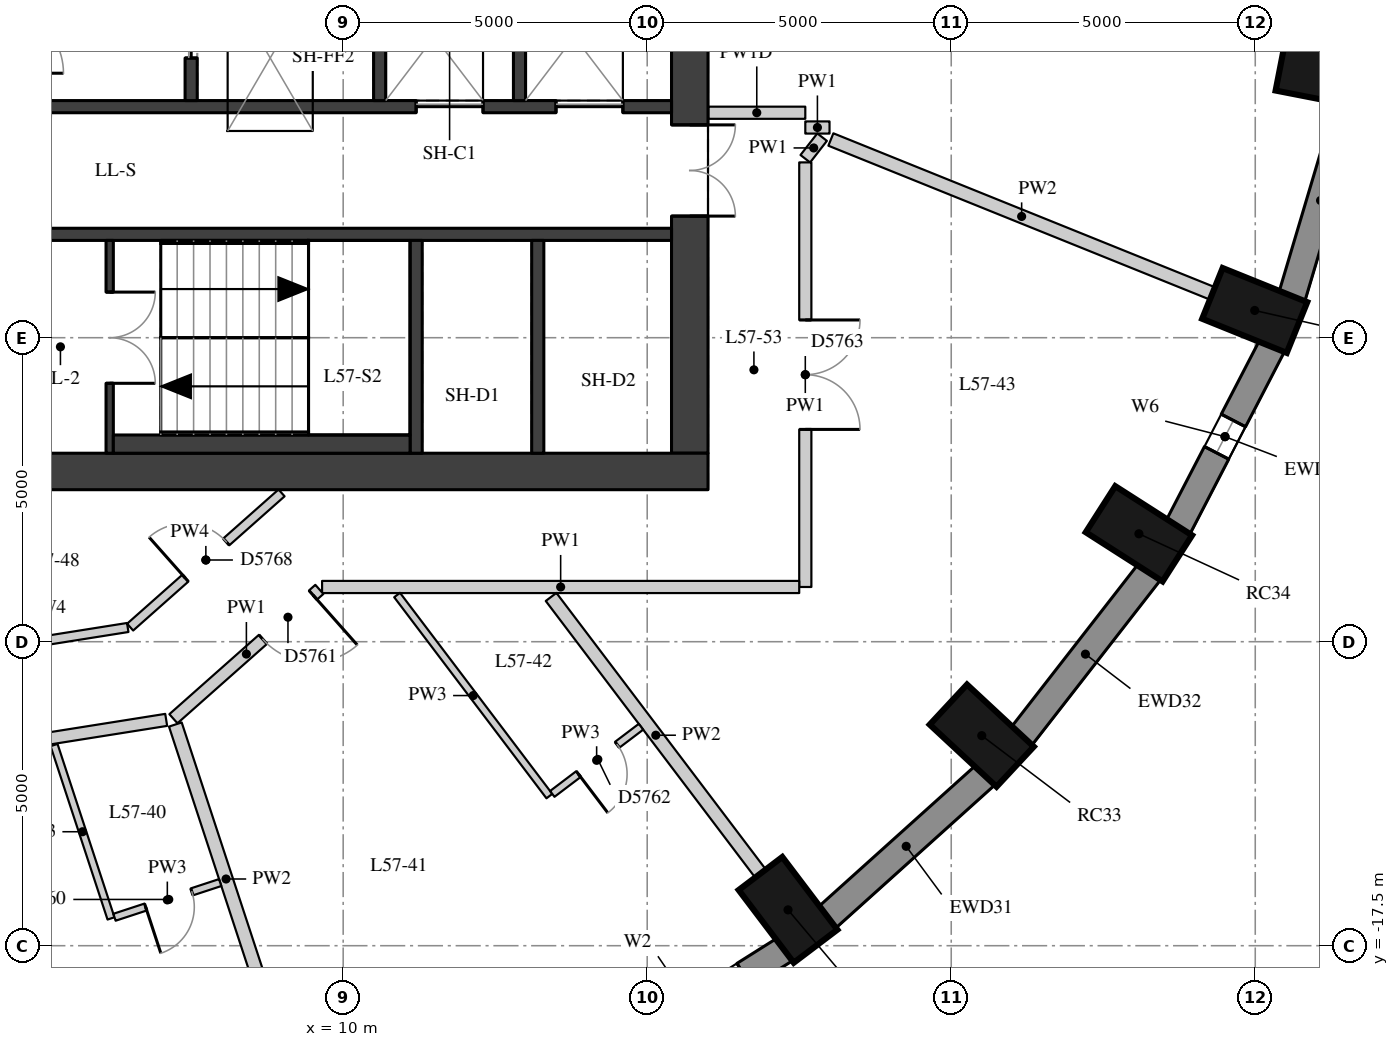
"""IFC4 building model, lengths in metres.
Left out: names, types, materials, properties, quantities, classifications, styles, units other than length and angle.
Written with IfcOpenShell. Run it as: python <this file> out.ifc"""

import sys

from ifc_helpers import new_model, si_unit, direction, frame, frame_2d, origin, origin_2d, place, context, subcontext, project, spatial, rectangle, extrude, element, fill, save


model = new_model("IFC4")
c1 = context("Model", 3, precision=1e-05, world=origin(), true_north=direction((0.0, 1.0)))
c2 = subcontext(c1, "Body", "Model", "MODEL_VIEW")
j1 = project(units=[si_unit("LENGTHUNIT", "METRE"), si_unit("PLANEANGLEUNIT", "RADIAN")], contexts=[c1])
p1 = place(None, origin())
s1 = spatial("IfcSite", under=j1, at=p1, CompositionType="ELEMENT")
p2 = place(p1, origin())
s2 = spatial("IfcBuilding", under=s1, at=p2, CompositionType="ELEMENT")
p3 = place(p2, frame((0.0, 0.0, 202.4)))
s3 = spatial("IfcBuildingStorey", under=s2, at=p3, CompositionType="ELEMENT", Elevation=202.4)
for number, where, z_axis, x_axis in (
    (1, (17.316, -16.911, 0.0), (0.0, 0.0, 1.0), (0.604, -0.797, 0.0)),
    (2, (20.502, -14.045, 0.0), (0.0, 0.0, 1.0), (0.732, -0.681, 0.0)),
    (3, (23.087, -10.725, 0.0), (0.0, 0.0, 1.0), (0.842, -0.539, 0.0)),
    (4, (24.991, -7.052, 0.0), (0.0, 0.0, 1.0), (0.927, -0.374, 0.0)),
    (5, (26.157, -3.137, 0.0), (0.0, 0.0, 1.0), (0.981, -0.192, 0.0)),
):
    element("IfcColumn", number, at=place(p3, frame(where, z_axis=z_axis, x_axis=x_axis)), inside=s3, PredefinedType="COLUMN", context=c2, shape_type="SweptSolid", body=[
        extrude(rectangle(XDim=1.5, YDim=0.9, at=origin_2d()), origin(), (0.0, 0.0, 1.0), 3.3),
    ])
p4 = place(p3, frame((14.232, -19.47, 0.0), z_axis=(0.0, 0.0, 1.0), x_axis=(0.84614984472, 0.532945063098, 0.0)))
e6 = element("IfcWall", 6, at=p4, inside=s3, PredefinedType="SOLIDWALL", context=c2, shape_type="SweptSolid", body=[
    extrude(rectangle(XDim=3.586, YDim=0.45, at=frame_2d((1.793, 0.0))), origin(), (0.0, 0.0, 1.0), 3.02),
])
p5 = place(p4, frame((0.793, 0.0, 0.4)))
e7 = element("IfcOpeningElement", 7, at=p5, cuts=e6, PredefinedType="OPENING", context=c2, shape_type="SweptSolid", body=[
    extrude(rectangle(XDim=2.0, YDim=1.75, at=frame_2d((1.0, 0.875))), frame((0.0, 0.235, 0.0), z_axis=(0.0, -1.0, 0.0), x_axis=(1.0, 0.0, 0.0)), (0.0, 0.0, 1.0), 0.47),
])
p6 = place(p3, frame((17.953, -17.04, 0.0), z_axis=(0.0, 0.0, 1.0), x_axis=(0.743442727602, 0.668799604348, 0.0)))
e8 = element("IfcWall", 8, at=p6, inside=s3, PredefinedType="SOLIDWALL", context=c2, shape_type="SweptSolid", body=[
    extrude(rectangle(XDim=3.513, YDim=0.45, at=frame_2d((1.756, 0.0))), origin(), (0.0, 0.0, 1.0), 3.02),
])
p7 = place(p3, frame((21.151, -14.061, 0.0), z_axis=(0.0, 0.0, 1.0), x_axis=(0.614255239631, 0.789107407509, 0.0)))
e9 = element("IfcWall", 9, at=p7, inside=s3, PredefinedType="SOLIDWALL", context=c2, shape_type="SweptSolid", body=[
    extrude(rectangle(XDim=3.438, YDim=0.45, at=frame_2d((1.719, 0.0))), origin(), (0.0, 0.0, 1.0), 3.02),
])
p8 = place(p3, frame((23.727, -10.624, 0.0), z_axis=(0.0, 0.0, 1.0), x_axis=(0.460175500475, 0.887827972505, 0.0)))
e10 = element("IfcWall", 10, at=p8, inside=s3, PredefinedType="SOLIDWALL", context=c2, shape_type="SweptSolid", body=[
    extrude(rectangle(XDim=3.371, YDim=0.45, at=frame_2d((1.685, 0.0))), origin(), (0.0, 0.0, 1.0), 3.02),
])
p9 = place(p8, frame((1.385, 0.0, 0.4)))
e11 = element("IfcOpeningElement", 11, at=p9, cuts=e10, PredefinedType="OPENING", context=c2, shape_type="SweptSolid", body=[
    extrude(rectangle(XDim=0.6, YDim=1.75, at=frame_2d((0.3, 0.875))), frame((0.0, 0.235, 0.0), z_axis=(0.0, -1.0, 0.0), x_axis=(1.0, 0.0, 0.0)), (0.0, 0.0, 1.0), 0.47),
])
p10 = place(p3, frame((25.6, -6.834, 0.0), z_axis=(0.0, 0.0, 1.0), x_axis=(0.285444972963, 0.958395099847, 0.0)))
e12 = element("IfcWall", 12, at=p10, inside=s3, PredefinedType="SOLIDWALL", context=c2, shape_type="SweptSolid", body=[
    extrude(rectangle(XDim=3.32, YDim=0.45, at=frame_2d((1.66, 0.0))), origin(), (0.0, 0.0, 1.0), 3.02),
])
p11 = place(p3, frame((15.7, -9.4, 0.0), z_axis=(0.0, 0.0, 1.0), x_axis=(0.0, 1.0, 0.0)))
e13 = element("IfcWall", 13, at=p11, inside=s3, PredefinedType="SHEAR", context=c2, shape_type="SweptSolid", body=[
    extrude(rectangle(XDim=18.8, YDim=0.6, at=frame_2d((9.4, 0.0))), origin(), (0.0, 0.0, 1.0), 3.02),
])
p12 = place(p11, frame((13.4, 0.0, 0.0)))
e14 = element("IfcOpeningElement", 14, at=p12, cuts=e13, PredefinedType="OPENING", context=c2, shape_type="SweptSolid", body=[
    extrude(rectangle(XDim=1.5, YDim=2.1, at=frame_2d((0.75, 1.05))), frame((0.0, 0.31, 0.0), z_axis=(0.0, -1.0, 0.0), x_axis=(1.0, 0.0, 0.0)), (0.0, 0.0, 1.0), 0.62),
])
p13 = place(p11, frame((3.9, 0.0, 0.0)))
e15 = element("IfcOpeningElement", 15, at=p13, cuts=e13, PredefinedType="OPENING", context=c2, shape_type="SweptSolid", body=[
    extrude(rectangle(XDim=1.5, YDim=2.1, at=frame_2d((0.75, 1.05))), frame((0.0, 0.31, 0.0), z_axis=(0.0, -1.0, 0.0), x_axis=(1.0, 0.0, 0.0)), (0.0, 0.0, 1.0), 0.62),
])
p14 = place(p3, frame((4.0, -9.7, 0.0), z_axis=(0.0, 0.0, 1.0), x_axis=(1.0, 0.0, 0.0)))
e16 = element("IfcWall", 16, at=p14, inside=s3, PredefinedType="SHEAR", context=c2, shape_type="SweptSolid", body=[
    extrude(rectangle(XDim=12.0, YDim=0.6, at=frame_2d((6.0, 0.0))), origin(), (0.0, 0.0, 1.0), 3.02),
])
p15 = place(p3, frame((4.6, -3.7, 0.0), z_axis=(0.0, 0.0, 1.0), x_axis=(1.0, 0.0, 0.0)))
e17 = element("IfcWall", 17, at=p15, inside=s3, PredefinedType="SHEAR", context=c2, shape_type="SweptSolid", body=[
    extrude(rectangle(XDim=10.8, YDim=0.2, at=frame_2d((5.4, 0.0))), origin(), (0.0, 0.0, 1.0), 3.02),
])
p16 = place(p15, frame((6.6, 0.0, 0.0)))
e18 = element("IfcOpeningElement", 18, at=p16, cuts=e17, PredefinedType="OPENING", context=c2, shape_type="SweptSolid", body=[
    extrude(rectangle(XDim=1.1, YDim=2.1, at=frame_2d((0.55, 1.05))), frame((0.0, 0.11, 0.0), z_axis=(0.0, -1.0, 0.0), x_axis=(1.0, 0.0, 0.0)), (0.0, 0.0, 1.0), 0.22),
])
p17 = place(p15, frame((8.9, 0.0, 0.0)))
e19 = element("IfcOpeningElement", 19, at=p17, cuts=e17, PredefinedType="OPENING", context=c2, shape_type="SweptSolid", body=[
    extrude(rectangle(XDim=1.1, YDim=2.1, at=frame_2d((0.55, 1.05))), frame((0.0, 0.11, 0.0), z_axis=(0.0, -1.0, 0.0), x_axis=(1.0, 0.0, 0.0)), (0.0, 0.0, 1.0), 0.22),
])
p18 = place(p3, frame((4.6, -5.8, 0.0), z_axis=(0.0, 0.0, 1.0), x_axis=(1.0, 0.0, 0.0)))
e20 = element("IfcWall", 20, at=p18, inside=s3, PredefinedType="SHEAR", context=c2, shape_type="SweptSolid", body=[
    extrude(rectangle(XDim=10.8, YDim=0.2, at=frame_2d((5.4, 0.0))), origin(), (0.0, 0.0, 1.0), 3.02),
])
for number, where, z_axis, x_axis in (
    (21, (11.2, -9.4, 0.0), (0.0, 0.0, 1.0), (0.0, 1.0, 0.0)),
    (22, (13.2, -9.4, 0.0), (0.0, 0.0, 1.0), (0.0, 1.0, 0.0)),
):
    element("IfcWall", number, at=place(p3, frame(where, z_axis=z_axis, x_axis=x_axis)), inside=s3, PredefinedType="SHEAR", context=c2, shape_type="SweptSolid", body=[
        extrude(rectangle(XDim=3.5, YDim=0.2, at=frame_2d((1.75, 0.0))), origin(), (0.0, 0.0, 1.0), 3.02),
    ])
p19 = place(p3, frame((7.5, -3.6, 0.0), z_axis=(0.0, 0.0, 1.0), x_axis=(0.0, 1.0, 0.0)))
e23 = element("IfcWall", 23, at=p19, inside=s3, PredefinedType="SHEAR", context=c2, shape_type="SweptSolid", body=[
    extrude(rectangle(XDim=2.5, YDim=0.2, at=frame_2d((1.25, 0.0))), origin(), (0.0, 0.0, 1.0), 3.02),
])
p20 = place(p19, frame((0.7, 0.0, 0.0)))
e24 = element("IfcOpeningElement", 24, at=p20, cuts=e23, PredefinedType="OPENING", context=c2, shape_type="SweptSolid", body=[
    extrude(rectangle(XDim=1.1, YDim=2.1, at=frame_2d((0.55, 1.05))), frame((0.0, 0.11, 0.0), z_axis=(0.0, -1.0, 0.0), x_axis=(1.0, 0.0, 0.0)), (0.0, 0.0, 1.0), 0.22),
])
for number, where, z_axis, x_axis in (
    (25, (10.6, -3.6, 0.0), (0.0, 0.0, 1.0), (0.0, 1.0, 0.0)),
    (26, (12.9, -3.6, 0.0), (0.0, 0.0, 1.0), (0.0, 1.0, 0.0)),
):
    element("IfcWall", number, at=place(p3, frame(where, z_axis=z_axis, x_axis=x_axis)), inside=s3, PredefinedType="SHEAR", context=c2, shape_type="SweptSolid", body=[
        extrude(rectangle(XDim=2.5, YDim=0.2, at=frame_2d((1.25, 0.0))), origin(), (0.0, 0.0, 1.0), 3.02),
    ])
p21 = place(p3, frame((6.16, -9.4, 0.0), z_axis=(0.0, 0.0, 1.0), x_axis=(0.0, 1.0, 0.0)))
e27 = element("IfcWall", 27, at=p21, inside=s3, PredefinedType="SHEAR", context=c2, shape_type="SweptSolid", body=[
    extrude(rectangle(XDim=3.5, YDim=0.12, at=frame_2d((1.75, 0.0))), origin(), (0.0, 0.0, 1.0), 3.02),
])
p22 = place(p21, frame((1.15, 0.0, 0.0)))
e28 = element("IfcOpeningElement", 28, at=p22, cuts=e27, PredefinedType="OPENING", context=c2, shape_type="SweptSolid", body=[
    extrude(rectangle(XDim=1.5, YDim=2.1, at=frame_2d((0.75, 1.05))), frame((0.0, 0.07, 0.0), z_axis=(0.0, -1.0, 0.0), x_axis=(1.0, 0.0, 0.0)), (0.0, 0.0, 1.0), 0.14),
])
p23 = place(p3, frame((6.22, -9.25, 0.0), z_axis=(0.0, 0.0, 1.0), x_axis=(1.0, 0.0, 0.0)))
e29 = element("IfcWall", 29, at=p23, inside=s3, PredefinedType="PARTITIONING", context=c2, shape_type="SweptSolid", body=[
    extrude(rectangle(XDim=4.88, YDim=0.3, at=frame_2d((2.44, 0.0))), origin(), (0.0, 0.0, 1.0), 3.02),
])
p24 = place(p3, frame((17.6, -4.043, 0.0), z_axis=(0.0, 0.0, 1.0), x_axis=(1.0, 0.0, 0.0)))
e30 = element("IfcWall", 30, at=p24, inside=s3, PredefinedType="PARTITIONING", context=c2, shape_type="SweptSolid", body=[
    extrude(rectangle(XDim=0.398, YDim=0.2, at=frame_2d((0.199, 0.0))), origin(), (0.0, 0.0, 1.0), 3.02),
])
p25 = place(p3, frame((17.876, -4.201, 0.0), z_axis=(0.0, 0.0, 1.0), x_axis=(-0.61405326993, -0.789264582816, 0.0)))
e31 = element("IfcWall", 31, at=p25, inside=s3, PredefinedType="PARTITIONING", context=c2, shape_type="SweptSolid", body=[
    extrude(rectangle(XDim=0.45, YDim=0.2, at=frame_2d((0.225, 0.0))), origin(), (0.0, 0.0, 1.0), 3.02),
])
p26 = place(p3, frame((17.6, -4.617, 0.0), z_axis=(0.0, 0.0, 1.0), x_axis=(0.0, -1.0, 0.0)))
e32 = element("IfcWall", 32, at=p26, inside=s3, PredefinedType="PARTITIONING", context=c2, shape_type="SweptSolid", body=[
    extrude(rectangle(XDim=6.983, YDim=0.2, at=frame_2d((3.492, 0.0))), origin(), (0.0, 0.0, 1.0), 3.02),
])
p27 = place(p26, frame((2.592, 0.0, 0.0)))
e33 = element("IfcOpeningElement", 33, at=p27, cuts=e32, PredefinedType="OPENING", context=c2, shape_type="SweptSolid", body=[
    extrude(rectangle(XDim=1.8, YDim=2.1, at=frame_2d((0.9, 1.05))), frame((0.0, 0.11, 0.0), z_axis=(0.0, -1.0, 0.0), x_axis=(1.0, 0.0, 0.0)), (0.0, 0.0, 1.0), 0.22),
])
p28 = place(p3, frame((17.5, -11.6, 0.0), z_axis=(0.0, 0.0, 1.0), x_axis=(-1.0, 0.0, 0.0)))
e34 = element("IfcWall", 34, at=p28, inside=s3, PredefinedType="PARTITIONING", context=c2, shape_type="SweptSolid", body=[
    extrude(rectangle(XDim=7.847, YDim=0.2, at=frame_2d((3.923, 0.0))), origin(), (0.0, 0.0, 1.0), 3.02),
])
p29 = place(p3, frame((9.608, -11.64, 0.0), z_axis=(0.0, 0.0, 1.0), x_axis=(-0.748412200225, -0.663233879227, 0.0)))
e35 = element("IfcWall", 35, at=p29, inside=s3, PredefinedType="PARTITIONING", context=c2, shape_type="SweptSolid", body=[
    extrude(rectangle(XDim=3.207, YDim=0.2, at=frame_2d((1.604, 0.0))), origin(), (0.0, 0.0, 1.0), 3.02),
])
p30 = place(p29, frame((0.14, 0.0, 0.0)))
e36 = element("IfcOpeningElement", 36, at=p30, cuts=e35, PredefinedType="OPENING", context=c2, shape_type="SweptSolid", body=[
    extrude(rectangle(XDim=1.1, YDim=2.1, at=frame_2d((0.55, 1.05))), frame((0.0, 0.11, 0.0), z_axis=(0.0, -1.0, 0.0), x_axis=(1.0, 0.0, 0.0)), (0.0, 0.0, 1.0), 0.22),
])
p31 = place(p3, frame((7.089, -13.786, 0.0), z_axis=(0.0, 0.0, 1.0), x_axis=(-0.987636270411, -0.156762869867, 0.0)))
e37 = element("IfcWall", 37, at=p31, inside=s3, PredefinedType="PARTITIONING", context=c2, shape_type="SweptSolid", body=[
    extrude(rectangle(XDim=6.469, YDim=0.2, at=frame_2d((3.235, 0.0))), origin(), (0.0, 0.0, 1.0), 2.42),
])
p32 = place(p31, frame((5.016, 0.0, 0.0)))
e38 = element("IfcOpeningElement", 38, at=p32, cuts=e37, PredefinedType="OPENING", context=c2, shape_type="SweptSolid", body=[
    extrude(rectangle(XDim=1.1, YDim=2.1, at=frame_2d((0.55, 1.05))), frame((0.0, 0.11, 0.0), z_axis=(0.0, -1.0, 0.0), x_axis=(1.0, 0.0, 0.0)), (0.0, 0.0, 1.0), 0.22),
])
p33 = place(p3, frame((16.004, -3.8, 0.0), z_axis=(0.0, 0.0, 1.0), x_axis=(1.0, 0.0, 0.0)))
e39 = element("IfcWall", 39, at=p33, inside=s3, PredefinedType="PARTITIONING", context=c2, shape_type="SweptSolid", body=[
    extrude(rectangle(XDim=1.596, YDim=0.2, at=frame_2d((0.798, 0.0))), origin(), (0.0, 0.0, 1.0), 2.47),
])
p34 = place(p3, frame((8.987, -10.052, 0.0), z_axis=(0.0, 0.0, 1.0), x_axis=(-0.74833949077, -0.66331591761, 0.0)))
e40 = element("IfcWall", 40, at=p34, inside=s3, PredefinedType="PARTITIONING", context=c2, shape_type="SweptSolid", body=[
    extrude(rectangle(XDim=3.328, YDim=0.15, at=frame_2d((1.664, 0.0))), origin(), (0.0, 0.0, 1.0), 3.02),
])
p35 = place(p34, frame((1.214, 0.0, 0.0)))
e41 = element("IfcOpeningElement", 41, at=p35, cuts=e40, PredefinedType="OPENING", context=c2, shape_type="SweptSolid", body=[
    extrude(rectangle(XDim=0.9, YDim=2.1, at=frame_2d((0.45, 1.05))), frame((0.0, 0.085, 0.0), z_axis=(0.0, -1.0, 0.0), x_axis=(1.0, 0.0, 0.0)), (0.0, 0.0, 1.0), 0.17),
])
p36 = place(p3, frame((6.457, -12.266, 0.0), z_axis=(0.0, 0.0, 1.0), x_axis=(-0.987639766053, -0.156740845063, 0.0)))
e42 = element("IfcWall", 42, at=p36, inside=s3, PredefinedType="PARTITIONING", context=c2, shape_type="SweptSolid", body=[
    extrude(rectangle(XDim=2.69, YDim=0.15, at=frame_2d((1.345, 0.0))), origin(), (0.0, 0.0, 1.0), 3.02),
])
p37 = place(p3, frame((8.908, -18.944, 0.0), z_axis=(0.0, 0.0, 1.0), x_axis=(-0.311910788491, 0.950111393481, 0.0)))
e43 = element("IfcWall", 43, at=p37, inside=s3, PredefinedType="PARTITIONING", context=c2, shape_type="SweptSolid", body=[
    extrude(rectangle(XDim=5.348, YDim=0.22, at=frame_2d((2.674, 0.0))), origin(), (0.0, 0.0, 1.0), 3.02),
])
p38 = place(p3, frame((16.863, -16.312, 0.0), z_axis=(0.0, 0.0, 1.0), x_axis=(-0.603636051313, 0.797260006243, 0.0)))
e44 = element("IfcWall", 44, at=p38, inside=s3, PredefinedType="PARTITIONING", context=c2, shape_type="SweptSolid", body=[
    extrude(rectangle(XDim=5.706, YDim=0.22, at=frame_2d((2.853, 0.0))), origin(), (0.0, 0.0, 1.0), 3.02),
])
p39 = place(p3, frame((24.295, -6.771, 0.0), z_axis=(0.0, 0.0, 1.0), x_axis=(-0.927382720906, 0.374114005305, 0.0)))
e45 = element("IfcWall", 45, at=p39, inside=s3, PredefinedType="PARTITIONING", context=c2, shape_type="SweptSolid", body=[
    extrude(rectangle(XDim=6.766, YDim=0.22, at=frame_2d((3.383, 0.0))), origin(), (0.0, 0.0, 1.0), 3.02),
])
p40 = place(p3, frame((5.245, -14.2, 0.0), z_axis=(0.0, 0.0, 1.0), x_axis=(0.31202743032, -0.950073093361, 0.0)))
e46 = element("IfcWall", 46, at=p40, inside=s3, PredefinedType="PARTITIONING", context=c2, shape_type="SweptSolid", body=[
    extrude(rectangle(XDim=3.001, YDim=0.12, at=frame_2d((1.501, 0.0))), origin(), (0.0, 0.0, 1.0), 3.02),
])
p41 = place(p3, frame((10.887, -11.732, 0.0), z_axis=(0.0, 0.0, 1.0), x_axis=(0.603646932038, -0.797251767913, 0.0)))
e47 = element("IfcWall", 47, at=p41, inside=s3, PredefinedType="PARTITIONING", context=c2, shape_type="SweptSolid", body=[
    extrude(rectangle(XDim=4.149, YDim=0.12, at=frame_2d((2.074, 0.0))), origin(), (0.0, 0.0, 1.0), 3.02),
])
p42 = place(p3, frame((6.239, -17.032, 0.0), z_axis=(0.0, 0.0, 1.0), x_axis=(0.950127811882, 0.311860771962, 0.0)))
e48 = element("IfcWall", 48, at=p42, inside=s3, PredefinedType="PARTITIONING", context=c2, shape_type="SweptSolid", body=[
    extrude(rectangle(XDim=1.83, YDim=0.12, at=frame_2d((0.915, 0.0))), origin(), (0.0, 0.0, 1.0), 3.02),
])
p43 = place(p42, frame((0.54, 0.0, 0.0)))
e49 = element("IfcOpeningElement", 49, at=p43, cuts=e48, PredefinedType="OPENING", context=c2, shape_type="SweptSolid", body=[
    extrude(rectangle(XDim=0.8, YDim=2.1, at=frame_2d((0.4, 1.05))), frame((0.0, 0.07, 0.0), z_axis=(0.0, -1.0, 0.0), x_axis=(1.0, 0.0, 0.0)), (0.0, 0.0, 1.0), 0.14),
])
p44 = place(p3, frame((13.439, -15.003, 0.0), z_axis=(0.0, 0.0, 1.0), x_axis=(0.797238062708, 0.603665032422, 0.0)))
e50 = element("IfcWall", 50, at=p44, inside=s3, PredefinedType="PARTITIONING", context=c2, shape_type="SweptSolid", body=[
    extrude(rectangle(XDim=1.83, YDim=0.12, at=frame_2d((0.915, 0.0))), origin(), (0.0, 0.0, 1.0), 3.02),
])
p45 = place(p44, frame((0.54, 0.0, 0.0)))
e51 = element("IfcOpeningElement", 51, at=p45, cuts=e50, PredefinedType="OPENING", context=c2, shape_type="SweptSolid", body=[
    extrude(rectangle(XDim=0.8, YDim=2.1, at=frame_2d((0.4, 1.05))), frame((0.0, 0.07, 0.0), z_axis=(0.0, -1.0, 0.0), x_axis=(1.0, 0.0, 0.0)), (0.0, 0.0, 1.0), 0.14),
])
p46 = place(p9, origin())
e52 = element("IfcWindow", 52, at=p46, inside=s3, PartitioningType="SINGLE_PANEL", PredefinedType="WINDOW", context=c2, shape_type="SweptSolid", body=[
    extrude(rectangle(XDim=0.6, YDim=1.75, at=frame_2d((0.3, 0.875))), frame((0.0, 0.035, 0.0), z_axis=(0.0, -1.0, 0.0), x_axis=(1.0, 0.0, 0.0)), (0.0, 0.0, 1.0), 0.06),
])
fill(e11, e52)
p47 = place(p13, origin())
e53 = element("IfcDoor", 53, at=p47, inside=s3, OperationType="DOUBLE_DOOR_SINGLE_SWING", PredefinedType="DOOR", context=c2, shape_type="SweptSolid", body=[
    extrude(rectangle(XDim=1.5, YDim=2.1, at=frame_2d((0.75, 1.05))), frame((0.0, 0.025, 0.0), z_axis=(0.0, -1.0, 0.0), x_axis=(1.0, 0.0, 0.0)), (0.0, 0.0, 1.0), 0.05),
])
fill(e15, e53)
p48 = place(p22, origin())
e54 = element("IfcDoor", 54, at=p48, inside=s3, OperationType="DOUBLE_DOOR_SINGLE_SWING", PredefinedType="DOOR", context=c2, shape_type="SweptSolid", body=[
    extrude(rectangle(XDim=1.5, YDim=2.1, at=frame_2d((0.75, 1.05))), frame((0.0, 0.025, 0.0), z_axis=(0.0, -1.0, 0.0), x_axis=(1.0, 0.0, 0.0)), (0.0, 0.0, 1.0), 0.05),
])
fill(e28, e54)
p49 = place(p16, origin())
e55 = element("IfcDoor", 55, at=p49, inside=s3, OperationType="DOUBLE_DOOR_SLIDING", PredefinedType="DOOR", context=c2, shape_type="SweptSolid", body=[
    extrude(rectangle(XDim=1.1, YDim=2.1, at=frame_2d((0.55, 1.05))), frame((0.0, 0.025, 0.0), z_axis=(0.0, -1.0, 0.0), x_axis=(1.0, 0.0, 0.0)), (0.0, 0.0, 1.0), 0.05),
])
fill(e18, e55)
p50 = place(p17, origin())
e56 = element("IfcDoor", 56, at=p50, inside=s3, OperationType="DOUBLE_DOOR_SLIDING", PredefinedType="DOOR", context=c2, shape_type="SweptSolid", body=[
    extrude(rectangle(XDim=1.1, YDim=2.1, at=frame_2d((0.55, 1.05))), frame((0.0, 0.025, 0.0), z_axis=(0.0, -1.0, 0.0), x_axis=(1.0, 0.0, 0.0)), (0.0, 0.0, 1.0), 0.05),
])
fill(e19, e56)
p51 = place(p20, origin())
e57 = element("IfcDoor", 57, at=p51, inside=s3, OperationType="DOUBLE_DOOR_SLIDING", PredefinedType="DOOR", context=c2, shape_type="SweptSolid", body=[
    extrude(rectangle(XDim=1.1, YDim=2.1, at=frame_2d((0.55, 1.05))), frame((0.0, 0.025, 0.0), z_axis=(0.0, -1.0, 0.0), x_axis=(1.0, 0.0, 0.0)), (0.0, 0.0, 1.0), 0.05),
])
fill(e24, e57)
p52 = place(p43, origin())
e58 = element("IfcDoor", 58, at=p52, inside=s3, OperationType="SINGLE_SWING_RIGHT", PredefinedType="DOOR", context=c2, shape_type="SweptSolid", body=[
    extrude(rectangle(XDim=0.8, YDim=2.1, at=frame_2d((0.4, 1.05))), frame((0.0, 0.025, 0.0), z_axis=(0.0, -1.0, 0.0), x_axis=(1.0, 0.0, 0.0)), (0.0, 0.0, 1.0), 0.05),
])
fill(e49, e58)
p53 = place(p30, origin())
e59 = element("IfcDoor", 59, at=p53, inside=s3, OperationType="SINGLE_SWING_LEFT", PredefinedType="DOOR", context=c2, shape_type="SweptSolid", body=[
    extrude(rectangle(XDim=1.1, YDim=2.1, at=frame_2d((0.55, 1.05))), frame((0.0, 0.025, 0.0), z_axis=(0.0, -1.0, 0.0), x_axis=(1.0, 0.0, 0.0)), (0.0, 0.0, 1.0), 0.05),
])
fill(e36, e59)
p54 = place(p45, origin())
e60 = element("IfcDoor", 60, at=p54, inside=s3, OperationType="SINGLE_SWING_RIGHT", PredefinedType="DOOR", context=c2, shape_type="SweptSolid", body=[
    extrude(rectangle(XDim=0.8, YDim=2.1, at=frame_2d((0.4, 1.05))), frame((0.0, 0.025, 0.0), z_axis=(0.0, -1.0, 0.0), x_axis=(1.0, 0.0, 0.0)), (0.0, 0.0, 1.0), 0.05),
])
fill(e51, e60)
p55 = place(p27, origin())
e61 = element("IfcDoor", 61, at=p55, inside=s3, OperationType="DOUBLE_DOOR_SINGLE_SWING", PredefinedType="DOOR", context=c2, shape_type="SweptSolid", body=[
    extrude(rectangle(XDim=1.8, YDim=2.1, at=frame_2d((0.9, 1.05))), frame((0.0, 0.025, 0.0), z_axis=(0.0, -1.0, 0.0), x_axis=(1.0, 0.0, 0.0)), (0.0, 0.0, 1.0), 0.05),
])
fill(e33, e61)
p56 = place(p35, origin())
e62 = element("IfcDoor", 62, at=p56, inside=s3, OperationType="SINGLE_SWING_LEFT", PredefinedType="DOOR", context=c2, shape_type="SweptSolid", body=[
    extrude(rectangle(XDim=0.9, YDim=2.1, at=frame_2d((0.45, 1.05))), frame((0.0, 0.025, 0.0), z_axis=(0.0, -1.0, 0.0), x_axis=(1.0, 0.0, 0.0)), (0.0, 0.0, 1.0), 0.05),
])
fill(e41, e62)
save(model, sys.argv[1])
